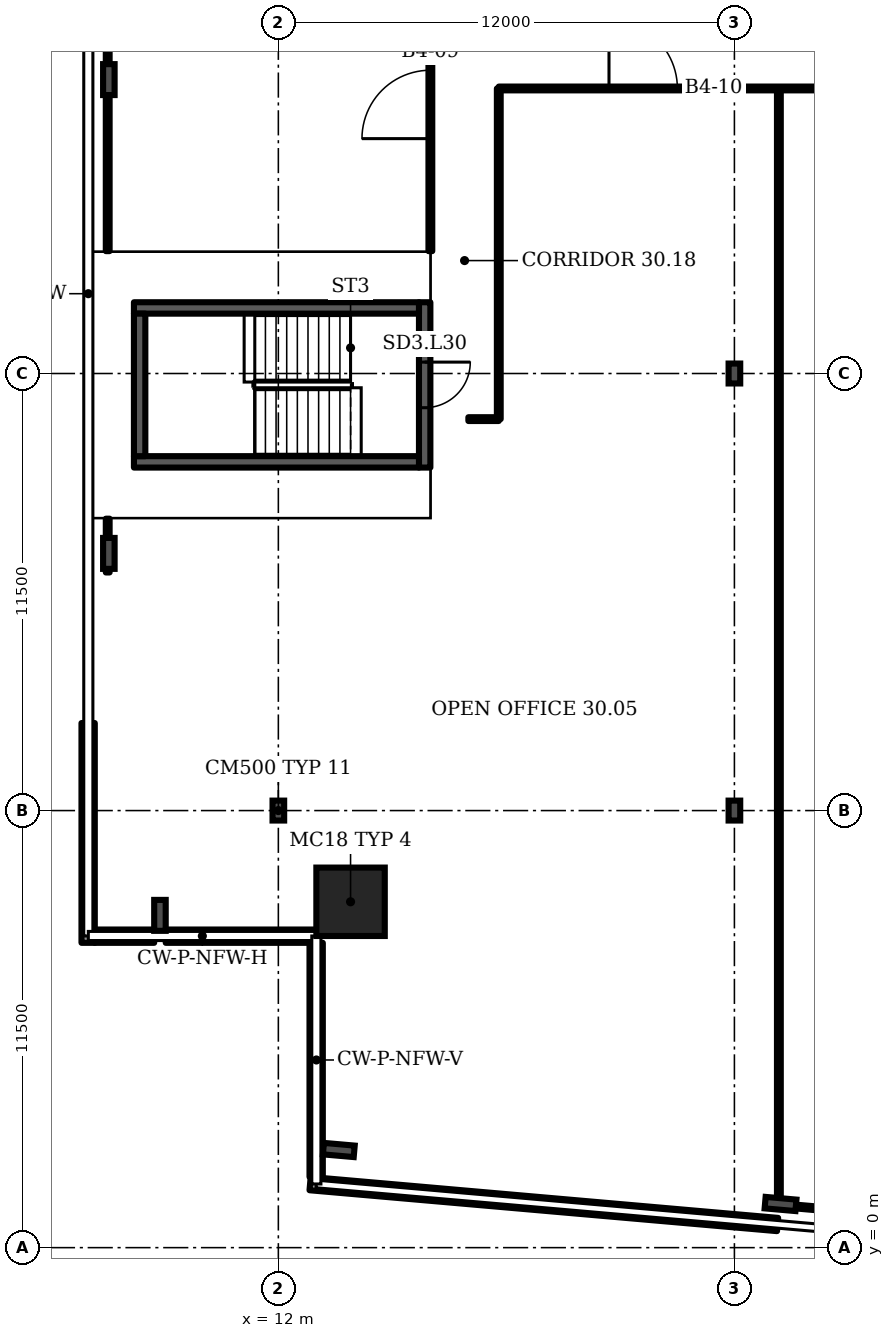
"""IFC4 building model, lengths in metres.
Left out: names, types, materials, properties, quantities, classifications, styles, units other than length and angle.
Written with IfcOpenShell. Run it as: python <this file> out.ifc"""

import sys

from ifc_helpers import new_model, si_unit, direction, frame, frame_2d, origin, origin_2d, place, context, subcontext, project, spatial, rectangle, i_section, extrude, element, fill, save


model = new_model("IFC4")
c1 = context("Model", 3, precision=1e-05, world=origin(), true_north=direction((0.0, 1.0)))
c2 = subcontext(c1, "Body", "Model", "MODEL_VIEW")
j1 = project(units=[si_unit("LENGTHUNIT", "METRE"), si_unit("PLANEANGLEUNIT", "RADIAN")], contexts=[c1])
p1 = place(None, origin())
s1 = spatial("IfcSite", under=j1, at=p1, CompositionType="ELEMENT")
p2 = place(p1, origin())
s2 = spatial("IfcBuilding", under=s1, at=p2, CompositionType="ELEMENT")
p3 = place(p2, frame((0.0, 0.0, 129.1)))
s3 = spatial("IfcBuildingStorey", under=s2, at=p3, CompositionType="ELEMENT", Elevation=129.1)
p4 = place(p3, frame((13.9, 9.1, 0.0), z_axis=(0.0, 0.0, 1.0), x_axis=(1.0, 0.0, 0.0)))
e1 = element("IfcColumn", 1, at=p4, inside=s3, PredefinedType="COLUMN", context=c2, shape_type="SweptSolid", body=[
    extrude(rectangle(XDim=1.8, YDim=1.8, at=origin_2d()), origin(), (0.0, 0.0, 1.0), 3.6),
])
for number, where, z_axis, x_axis in (
    (2, (13.591, 2.569, 0.0), (0.0, 0.0, 1.0), (-0.087, -0.996, 0.0)),
    (3, (25.214, 1.149, 0.0), (0.0, 0.0, 1.0), (-0.087, -0.996, 0.0)),
    (4, (7.54, 30.733, 0.0), (0.0, 0.0, 1.0), (-1.0, 0.0, 0.0)),
    (5, (7.54, 18.267, 0.0), (0.0, 0.0, 1.0), (-1.0, 0.0, 0.0)),
    (6, (8.885, 8.743, 0.0), (0.0, 0.0, 1.0), (-1.0, 0.0, 0.0)),
):
    element("IfcColumn", number, at=place(p3, frame(where, z_axis=z_axis, x_axis=x_axis)), inside=s3, PredefinedType="COLUMN", context=c2, shape_type="SweptSolid", body=[
        extrude(i_section(OverallWidth=0.303, OverallDepth=0.814, WebThickness=0.021, FlangeThickness=0.04, FilletRadius=0.03, at=origin_2d()), origin(), (0.0, 0.0, 1.0), 3.6),
    ])
for number, where, z_axis, x_axis in (
    (7, (12.0, 11.5, 0.0), (0.0, 0.0, 1.0), (1.0, 0.0, 0.0)),
    (8, (24.0, 11.5, 0.0), (0.0, 0.0, 1.0), (1.0, 0.0, 0.0)),
    (9, (24.0, 23.0, 0.0), (0.0, 0.0, 1.0), (1.0, 0.0, 0.0)),
):
    element("IfcColumn", number, at=place(p3, frame(where, z_axis=z_axis, x_axis=x_axis)), inside=s3, PredefinedType="COLUMN", context=c2, shape_type="SweptSolid", body=[
        extrude(i_section(OverallWidth=0.306, OverallDepth=0.524, WebThickness=0.021, FlangeThickness=0.04, FilletRadius=0.027, at=origin_2d()), origin(), (0.0, 0.0, 1.0), 3.6),
    ])
p5 = place(p3, frame((12.835, 1.685, 0.0), z_axis=(0.0, 0.0, 1.0), x_axis=(0.996192, -0.087173, 0.0)))
e10 = element("IfcWall", 10, at=p5, inside=s3, PredefinedType="SOLIDWALL", context=c2, shape_type="SweptSolid", body=[
    extrude(rectangle(XDim=12.348, YDim=0.35, at=frame_2d((6.174, 0.0))), origin(), (0.0, 0.0, 1.0), 1.0),
])
p6 = place(p3, frame((6.995, 13.803, 0.0), z_axis=(0.0, 0.0, 1.0), x_axis=(0.0, -1.0, 0.0)))
e11 = element("IfcWall", 11, at=p6, inside=s3, PredefinedType="SOLIDWALL", context=c2, shape_type="SweptSolid", body=[
    extrude(rectangle(XDim=5.783, YDim=0.35, at=frame_2d((2.892, 0.0))), origin(), (0.0, 0.0, 1.0), 1.0),
])
p7 = place(p3, frame((7.17, 8.195, 0.0), z_axis=(0.0, 0.0, 1.0), x_axis=(1.0, 0.0, 0.0)))
e12 = element("IfcWall", 12, at=p7, inside=s3, PredefinedType="SOLIDWALL", context=c2, shape_type="SweptSolid", body=[
    extrude(rectangle(XDim=1.563, YDim=0.35, at=frame_2d((0.782, 0.0))), origin(), (0.0, 0.0, 1.0), 1.0),
])
p8 = place(p3, frame((9.036, 8.195, 0.0), z_axis=(0.0, 0.0, 1.0), x_axis=(1.0, 0.0, 0.0)))
e13 = element("IfcWall", 13, at=p8, inside=s3, PredefinedType="SOLIDWALL", context=c2, shape_type="SweptSolid", body=[
    extrude(rectangle(XDim=3.964, YDim=0.35, at=frame_2d((1.982, 0.0))), origin(), (0.0, 0.0, 1.0), 1.0),
])
p9 = place(p3, frame((12.995, 8.02, 0.0), z_axis=(0.0, 0.0, 1.0), x_axis=(0.0, -1.0, 0.0)))
e14 = element("IfcWall", 14, at=p9, inside=s3, PredefinedType="SOLIDWALL", context=c2, shape_type="SweptSolid", body=[
    extrude(rectangle(XDim=6.161, YDim=0.35, at=frame_2d((3.081, 0.0))), origin(), (0.0, 0.0, 1.0), 1.0),
])
p10 = place(p3, frame((15.85, 20.525, 0.0), z_axis=(0.0, 0.0, 1.0), x_axis=(0.0, 1.0, 0.0)))
e15 = element("IfcWall", 15, at=p10, inside=s3, PredefinedType="SHEAR", context=c2, shape_type="SweptSolid", body=[
    extrude(rectangle(XDim=4.35, YDim=0.3, at=frame_2d((2.175, 0.0))), origin(), (0.0, 0.0, 1.0), 3.2),
])
p11 = place(p10, frame((1.575, 0.0, 0.0)))
e16 = element("IfcOpeningElement", 16, at=p11, cuts=e15, PredefinedType="OPENING", context=c2, shape_type="SweptSolid", body=[
    extrude(rectangle(XDim=1.2, YDim=2.1, at=frame_2d((0.6, 1.05))), frame((0.0, 0.16, 0.0), z_axis=(0.0, -1.0, 0.0), x_axis=(1.0, 0.0, 0.0)), (0.0, 0.0, 1.0), 0.32),
])
p12 = place(p3, frame((7.51, 17.765, 0.0), z_axis=(0.0, 0.0, 1.0), x_axis=(0.0, 1.0, 0.0)))
e17 = element("IfcWall", 17, at=p12, inside=s3, PredefinedType="PARTITIONING", context=c2, shape_type="SweptSolid", body=[
    extrude(rectangle(XDim=1.415, YDim=0.1, at=frame_2d((0.708, 0.0))), origin(), (0.0, 0.0, 1.0), 2.58),
])
p13 = place(p3, frame((7.51, 26.22, 0.0), z_axis=(0.0, 0.0, 1.0), x_axis=(0.0, 1.0, 0.0)))
e18 = element("IfcWall", 18, at=p13, inside=s3, PredefinedType="PARTITIONING", context=c2, shape_type="SweptSolid", body=[
    extrude(rectangle(XDim=15.76, YDim=0.1, at=frame_2d((7.88, 0.0))), origin(), (0.0, 0.0, 1.0), 2.58),
])
p14 = place(p3, frame((16.0, 26.22, 0.0), z_axis=(0.0, 0.0, 1.0), x_axis=(0.0, 1.0, 0.0)))
e19 = element("IfcWall", 19, at=p14, inside=s3, PredefinedType="PARTITIONING", context=c2, shape_type="SweptSolid", body=[
    extrude(rectangle(XDim=7.76, YDim=0.1, at=frame_2d((3.88, 0.0))), origin(), (0.0, 0.0, 1.0), 3.2),
])
p15 = place(p14, frame((2.96, 0.0, 0.0)))
e20 = element("IfcOpeningElement", 20, at=p15, cuts=e19, PredefinedType="OPENING", context=c2, shape_type="SweptSolid", body=[
    extrude(rectangle(XDim=1.8, YDim=2.1, at=frame_2d((0.9, 1.05))), frame((0.0, 0.06, 0.0), z_axis=(0.0, -1.0, 0.0), x_axis=(1.0, 0.0, 0.0)), (0.0, 0.0, 1.0), 0.12),
])
p16 = place(p3, frame((17.0, 21.8, 0.0), z_axis=(0.0, 0.0, 1.0), x_axis=(1.0, 0.0, 0.0)))
e21 = element("IfcWall", 21, at=p16, inside=s3, PredefinedType="PARTITIONING", context=c2, shape_type="SweptSolid", body=[
    extrude(rectangle(XDim=0.8, YDim=0.1, at=frame_2d((0.4, 0.0))), origin(), (0.0, 0.0, 1.0), 3.2),
])
p17 = place(p3, frame((17.8, 21.8, 0.0), z_axis=(0.0, 0.0, 1.0), x_axis=(0.0, 1.0, 0.0)))
e22 = element("IfcWall", 22, at=p17, inside=s3, PredefinedType="PARTITIONING", context=c2, shape_type="SweptSolid", body=[
    extrude(rectangle(XDim=8.7, YDim=0.1, at=frame_2d((4.35, 0.0))), origin(), (0.0, 0.0, 1.0), 3.2),
])
p18 = place(p3, frame((17.8, 30.5, 0.0), z_axis=(0.0, 0.0, 1.0), x_axis=(1.0, 0.0, 0.0)))
e23 = element("IfcWall", 23, at=p18, inside=s3, PredefinedType="PARTITIONING", context=c2, shape_type="SweptSolid", body=[
    extrude(rectangle(XDim=19.05, YDim=0.1, at=frame_2d((9.525, 0.0))), origin(), (0.0, 0.0, 1.0), 3.2),
])
p19 = place(p18, frame((2.9, 0.0, 0.0)))
e24 = element("IfcOpeningElement", 24, at=p19, cuts=e23, PredefinedType="OPENING", context=c2, shape_type="SweptSolid", body=[
    extrude(rectangle(XDim=1.8, YDim=2.1, at=frame_2d((0.9, 1.05))), frame((0.0, 0.06, 0.0), z_axis=(0.0, -1.0, 0.0), x_axis=(1.0, 0.0, 0.0)), (0.0, 0.0, 1.0), 0.12),
])
p20 = place(p18, frame((9.99, 0.0, 0.0)))
e25 = element("IfcOpeningElement", 25, at=p20, cuts=e23, PredefinedType="OPENING", context=c2, shape_type="SweptSolid", body=[
    extrude(rectangle(XDim=1.0, YDim=2.1, at=frame_2d((0.5, 1.05))), frame((0.0, 0.06, 0.0), z_axis=(0.0, -1.0, 0.0), x_axis=(1.0, 0.0, 0.0)), (0.0, 0.0, 1.0), 0.12),
])
p21 = place(p18, frame((15.75, 0.0, 0.0)))
e26 = element("IfcOpeningElement", 26, at=p21, cuts=e23, PredefinedType="OPENING", context=c2, shape_type="SweptSolid", body=[
    extrude(rectangle(XDim=1.0, YDim=2.1, at=frame_2d((0.5, 1.05))), frame((0.0, 0.06, 0.0), z_axis=(0.0, -1.0, 0.0), x_axis=(1.0, 0.0, 0.0)), (0.0, 0.0, 1.0), 0.12),
])
p22 = place(p3, frame((25.17, 1.12, 0.0), z_axis=(0.0, 0.0, 1.0), x_axis=(0.0, 1.0, 0.0)))
e27 = element("IfcWall", 27, at=p22, inside=s3, PredefinedType="PARTITIONING", context=c2, shape_type="SweptSolid", body=[
    extrude(rectangle(XDim=29.38, YDim=0.1, at=frame_2d((14.69, 0.0))), origin(), (0.0, 0.0, 1.0), 3.2),
])
p23 = place(p3, frame((31.25, 0.59, 0.0), z_axis=(0.0, 0.0, 1.0), x_axis=(-0.996218, 0.086845, 0.0)))
e28 = element("IfcWall", 28, at=p23, inside=s3, PredefinedType="PARTITIONING", context=c2, shape_type="SweptSolid", body=[
    extrude(rectangle(XDim=6.103, YDim=0.1, at=frame_2d((3.052, 0.0))), origin(), (0.0, 0.0, 1.0), 2.58),
])
for number, where, z_axis, x_axis in (
    (29, (8.2, 20.675, 0.0), (0.0, 0.0, 1.0), (1.0, 0.0, 0.0)),
    (30, (8.2, 24.725, 0.0), (0.0, 0.0, 1.0), (1.0, 0.0, 0.0)),
):
    element("IfcWall", number, at=place(p3, frame(where, z_axis=z_axis, x_axis=x_axis)), inside=s3, PredefinedType="SHEAR", context=c2, shape_type="SweptSolid", body=[
        extrude(rectangle(XDim=7.5, YDim=0.3, at=frame_2d((3.75, 0.0))), origin(), (0.0, 0.0, 1.0), 3.2),
    ])
p24 = place(p3, frame((8.35, 20.825, 0.0), z_axis=(0.0, 0.0, 1.0), x_axis=(0.0, 1.0, 0.0)))
e31 = element("IfcWall", 31, at=p24, inside=s3, PredefinedType="SHEAR", context=c2, shape_type="SweptSolid", body=[
    extrude(rectangle(XDim=3.75, YDim=0.3, at=frame_2d((1.875, 0.0))), origin(), (0.0, 0.0, 1.0), 3.2),
])
p25 = place(p11, origin())
e32 = element("IfcDoor", 32, at=p25, inside=s3, OperationType="SINGLE_SWING_RIGHT", PredefinedType="DOOR", context=c2, shape_type="SweptSolid", body=[
    extrude(rectangle(XDim=1.2, YDim=2.1, at=frame_2d((0.6, 1.05))), frame((0.0, 0.025, 0.0), z_axis=(0.0, -1.0, 0.0), x_axis=(1.0, 0.0, 0.0)), (0.0, 0.0, 1.0), 0.05),
])
fill(e16, e32)
p26 = place(p15, origin())
e33 = element("IfcDoor", 33, at=p26, inside=s3, OperationType="DOUBLE_DOOR_SINGLE_SWING", PredefinedType="DOOR", context=c2, shape_type="SweptSolid", body=[
    extrude(rectangle(XDim=1.8, YDim=2.1, at=frame_2d((0.9, 1.05))), frame((0.0, 0.025, 0.0), z_axis=(0.0, -1.0, 0.0), x_axis=(1.0, 0.0, 0.0)), (0.0, 0.0, 1.0), 0.05),
])
fill(e20, e33)
p27 = place(p19, origin())
e34 = element("IfcDoor", 34, at=p27, inside=s3, OperationType="DOUBLE_DOOR_SINGLE_SWING", PredefinedType="DOOR", context=c2, shape_type="SweptSolid", body=[
    extrude(rectangle(XDim=1.8, YDim=2.1, at=frame_2d((0.9, 1.05))), frame((0.0, 0.025, 0.0), z_axis=(0.0, -1.0, 0.0), x_axis=(1.0, 0.0, 0.0)), (0.0, 0.0, 1.0), 0.05),
])
fill(e24, e34)
save(model, sys.argv[1])
